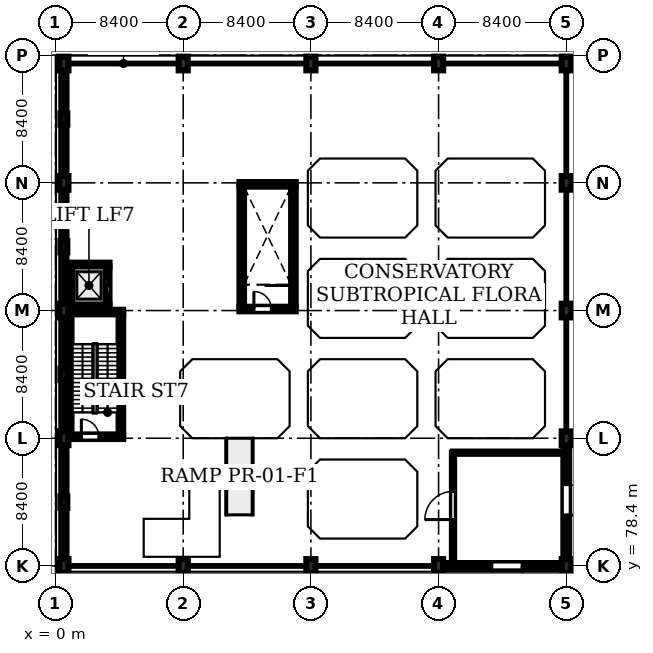
"""IFC4 building model, lengths in metres.
Left out: names, types, materials, properties, quantities, classifications, styles, units other than length and angle.
Written with IfcOpenShell. Run it as: python <this file> out.ifc"""

import sys

from ifc_helpers import new_model, si_unit, direction, frame, frame_2d, origin, origin_2d, place, context, subcontext, project, spatial, rectangle, extrude, element, fill, save


model = new_model("IFC4")
c1 = context("Model", 3, precision=1e-05, world=origin(), true_north=direction((0.0, 1.0)))
c2 = subcontext(c1, "Body", "Model", "MODEL_VIEW")
j1 = project(units=[si_unit("LENGTHUNIT", "METRE"), si_unit("PLANEANGLEUNIT", "RADIAN")], contexts=[c1])
p1 = place(None, origin())
s1 = spatial("IfcSite", under=j1, at=p1, CompositionType="ELEMENT")
p2 = place(p1, origin())
s2 = spatial("IfcBuilding", under=s1, at=p2, CompositionType="ELEMENT")
p3 = place(p2, origin())
s3 = spatial("IfcBuildingStorey", under=s2, at=p3, CompositionType="ELEMENT", Elevation=0.0)
for number, where, z_axis, x_axis in (
    (1, (0.55, 78.4, 0.0), (0.0, 0.0, 1.0), (1.0, 0.0, 0.0)),
    (2, (0.55, 86.8, 0.0), (0.0, 0.0, 1.0), (1.0, 0.0, 0.0)),
    (3, (0.55, 95.2, 0.0), (0.0, 0.0, 1.0), (1.0, 0.0, 0.0)),
    (4, (0.55, 103.6, 0.0), (0.0, 0.0, 1.0), (1.0, 0.0, 0.0)),
    (5, (0.55, 111.45, 0.0), (0.0, 0.0, 1.0), (1.0, 0.0, 0.0)),
):
    element("IfcColumn", number, at=place(p3, frame(where, z_axis=z_axis, x_axis=x_axis)), inside=s3, PredefinedType="COLUMN", context=c2, shape_type="SweptSolid", body=[
        extrude(rectangle(XDim=0.6, YDim=0.9, at=origin_2d()), origin(), (0.0, 0.0, 1.0), 5.18),
    ])
p4 = place(p3, frame((8.4, 78.4, 0.0), z_axis=(0.0, 0.0, 1.0), x_axis=(1.0, 0.0, 0.0)))
e6 = element("IfcColumn", 6, at=p4, inside=s3, PredefinedType="COLUMN", context=c2, shape_type="SweptSolid", body=[
    extrude(rectangle(XDim=0.6, YDim=0.9, at=origin_2d()), origin(), (0.0, 0.0, 1.0), 5.4),
])
p5 = place(p3, frame((8.4, 111.45, 0.0), z_axis=(0.0, 0.0, 1.0), x_axis=(1.0, 0.0, 0.0)))
e7 = element("IfcColumn", 7, at=p5, inside=s3, PredefinedType="COLUMN", context=c2, shape_type="SweptSolid", body=[
    extrude(rectangle(XDim=0.6, YDim=0.9, at=origin_2d()), origin(), (0.0, 0.0, 1.0), 5.18),
])
p6 = place(p3, frame((16.8, 78.4, 0.0), z_axis=(0.0, 0.0, 1.0), x_axis=(1.0, 0.0, 0.0)))
e8 = element("IfcColumn", 8, at=p6, inside=s3, PredefinedType="COLUMN", context=c2, shape_type="SweptSolid", body=[
    extrude(rectangle(XDim=0.6, YDim=0.9, at=origin_2d()), origin(), (0.0, 0.0, 1.0), 5.4),
])
p7 = place(p3, frame((16.8, 111.45, 0.0), z_axis=(0.0, 0.0, 1.0), x_axis=(1.0, 0.0, 0.0)))
e9 = element("IfcColumn", 9, at=p7, inside=s3, PredefinedType="COLUMN", context=c2, shape_type="SweptSolid", body=[
    extrude(rectangle(XDim=0.6, YDim=0.9, at=origin_2d()), origin(), (0.0, 0.0, 1.0), 5.18),
])
p8 = place(p3, frame((25.2, 78.4, 0.0), z_axis=(0.0, 0.0, 1.0), x_axis=(1.0, 0.0, 0.0)))
e10 = element("IfcColumn", 10, at=p8, inside=s3, PredefinedType="COLUMN", context=c2, shape_type="SweptSolid", body=[
    extrude(rectangle(XDim=0.6, YDim=0.9, at=origin_2d()), origin(), (0.0, 0.0, 1.0), 5.4),
])
p9 = place(p3, frame((25.2, 111.45, 0.0), z_axis=(0.0, 0.0, 1.0), x_axis=(1.0, 0.0, 0.0)))
e11 = element("IfcColumn", 11, at=p9, inside=s3, PredefinedType="COLUMN", context=c2, shape_type="SweptSolid", body=[
    extrude(rectangle(XDim=0.6, YDim=0.9, at=origin_2d()), origin(), (0.0, 0.0, 1.0), 5.18),
])
for number, where, z_axis, x_axis in (
    (12, (33.6, 78.4, 0.0), (0.0, 0.0, 1.0), (1.0, 0.0, 0.0)),
    (13, (33.6, 86.8, 0.0), (0.0, 0.0, 1.0), (1.0, 0.0, 0.0)),
    (14, (33.6, 95.2, 0.0), (0.0, 0.0, 1.0), (1.0, 0.0, 0.0)),
    (15, (33.6, 103.6, 0.0), (0.0, 0.0, 1.0), (1.0, 0.0, 0.0)),
):
    element("IfcColumn", number, at=place(p3, frame(where, z_axis=z_axis, x_axis=x_axis)), inside=s3, PredefinedType="COLUMN", context=c2, shape_type="SweptSolid", body=[
        extrude(rectangle(XDim=0.6, YDim=0.9, at=origin_2d()), origin(), (0.0, 0.0, 1.0), 5.4),
    ])
p10 = place(p3, frame((33.6, 111.45, 0.0), z_axis=(0.0, 0.0, 1.0), x_axis=(1.0, 0.0, 0.0)))
e16 = element("IfcColumn", 16, at=p10, inside=s3, PredefinedType="COLUMN", context=c2, shape_type="SweptSolid", body=[
    extrude(rectangle(XDim=0.6, YDim=0.9, at=origin_2d()), origin(), (0.0, 0.0, 1.0), 5.18),
])
for number, where, z_axis, x_axis in (
    (17, (0.55, 82.6, 0.0), (0.0, 0.0, 1.0), (1.0, 0.0, 0.0)),
    (18, (0.55, 91.0, 0.0), (0.0, 0.0, 1.0), (1.0, 0.0, 0.0)),
    (19, (0.55, 99.4, 0.0), (0.0, 0.0, 1.0), (1.0, 0.0, 0.0)),
    (20, (0.55, 107.8, 0.0), (0.0, 0.0, 1.0), (1.0, 0.0, 0.0)),
):
    element("IfcColumn", number, at=place(p3, frame(where, z_axis=z_axis, x_axis=x_axis)), inside=s3, PredefinedType="PILASTER", context=c2, shape_type="SweptSolid", body=[
        extrude(rectangle(XDim=0.45, YDim=0.75, at=origin_2d()), origin(), (0.0, 0.0, 1.0), 5.18),
    ])
p11 = place(p3, frame((0.75, 86.9, 0.0), z_axis=(0.0, 0.0, 1.0), x_axis=(1.0, 0.0, 0.0)))
e21 = element("IfcWall", 21, at=p11, inside=s3, PredefinedType="SHEAR", context=c2, shape_type="SweptSolid", body=[
    extrude(rectangle(XDim=3.7, YDim=0.3, at=frame_2d((1.85, 0.0))), origin(), (0.0, 0.0, 1.0), 5.18),
])
p12 = place(p11, frame((0.95, 0.0, 0.0)))
e22 = element("IfcOpeningElement", 22, at=p12, cuts=e21, PredefinedType="OPENING", context=c2, shape_type="SweptSolid", body=[
    extrude(rectangle(XDim=1.15, YDim=2.15, at=frame_2d((0.575, 1.075))), frame((0.0, 0.16, 0.0), z_axis=(0.0, -1.0, 0.0), x_axis=(1.0, 0.0, 0.0)), (0.0, 0.0, 1.0), 0.32),
])
p13 = place(p3, frame((0.75, 95.1, 0.0), z_axis=(0.0, 0.0, 1.0), x_axis=(1.0, 0.0, 0.0)))
e23 = element("IfcWall", 23, at=p13, inside=s3, PredefinedType="SHEAR", context=c2, shape_type="SweptSolid", body=[
    extrude(rectangle(XDim=3.7, YDim=0.3, at=frame_2d((1.85, 0.0))), origin(), (0.0, 0.0, 1.0), 5.18),
])
for number, where, z_axis, x_axis in (
    (24, (0.9, 87.05, 0.0), (0.0, 0.0, 1.0), (0.0, 1.0, 0.0)),
    (25, (4.3, 87.05, 0.0), (0.0, 0.0, 1.0), (0.0, 1.0, 0.0)),
):
    element("IfcWall", number, at=place(p3, frame(where, z_axis=z_axis, x_axis=x_axis)), inside=s3, PredefinedType="SHEAR", context=c2, shape_type="SweptSolid", body=[
        extrude(rectangle(XDim=7.9, YDim=0.3, at=frame_2d((3.95, 0.0))), origin(), (0.0, 0.0, 1.0), 5.18),
    ])
p14 = place(p3, frame((12.1, 95.3, 0.0), z_axis=(0.0, 0.0, 1.0), x_axis=(1.0, 0.0, 0.0)))
e26 = element("IfcWall", 26, at=p14, inside=s3, PredefinedType="SHEAR", context=c2, shape_type="SweptSolid", body=[
    extrude(rectangle(XDim=3.7, YDim=0.3, at=frame_2d((1.85, 0.0))), origin(), (0.0, 0.0, 1.0), 5.18),
])
p15 = place(p14, frame((0.95, 0.0, 0.0)))
e27 = element("IfcOpeningElement", 27, at=p15, cuts=e26, PredefinedType="OPENING", context=c2, shape_type="SweptSolid", body=[
    extrude(rectangle(XDim=1.15, YDim=2.15, at=frame_2d((0.575, 1.075))), frame((0.0, 0.16, 0.0), z_axis=(0.0, -1.0, 0.0), x_axis=(1.0, 0.0, 0.0)), (0.0, 0.0, 1.0), 0.32),
])
p16 = place(p3, frame((12.1, 103.5, 0.0), z_axis=(0.0, 0.0, 1.0), x_axis=(1.0, 0.0, 0.0)))
e28 = element("IfcWall", 28, at=p16, inside=s3, PredefinedType="SHEAR", context=c2, shape_type="SweptSolid", body=[
    extrude(rectangle(XDim=3.7, YDim=0.3, at=frame_2d((1.85, 0.0))), origin(), (0.0, 0.0, 1.0), 5.18),
])
for number, where, z_axis, x_axis in (
    (29, (12.25, 95.45, 0.0), (0.0, 0.0, 1.0), (0.0, 1.0, 0.0)),
    (30, (15.65, 95.45, 0.0), (0.0, 0.0, 1.0), (0.0, 1.0, 0.0)),
):
    element("IfcWall", number, at=place(p3, frame(where, z_axis=z_axis, x_axis=x_axis)), inside=s3, PredefinedType="SHEAR", context=c2, shape_type="SweptSolid", body=[
        extrude(rectangle(XDim=7.9, YDim=0.3, at=frame_2d((3.95, 0.0))), origin(), (0.0, 0.0, 1.0), 5.18),
    ])
for number, where, z_axis, x_axis in (
    (31, (0.85, 95.475, 0.0), (0.0, 0.0, 1.0), (1.0, 0.0, 0.0)),
    (32, (0.85, 98.225, 0.0), (0.0, 0.0, 1.0), (1.0, 0.0, 0.0)),
):
    element("IfcWall", number, at=place(p3, frame(where, z_axis=z_axis, x_axis=x_axis)), inside=s3, PredefinedType="SHEAR", context=c2, shape_type="SweptSolid", body=[
        extrude(rectangle(XDim=2.7, YDim=0.25, at=frame_2d((1.35, 0.0))), origin(), (0.0, 0.0, 1.0), 5.18),
    ])
p17 = place(p3, frame((0.975, 95.6, 0.0), z_axis=(0.0, 0.0, 1.0), x_axis=(0.0, 1.0, 0.0)))
e33 = element("IfcWall", 33, at=p17, inside=s3, PredefinedType="SHEAR", context=c2, shape_type="SweptSolid", body=[
    extrude(rectangle(XDim=2.5, YDim=0.25, at=frame_2d((1.25, 0.0))), origin(), (0.0, 0.0, 1.0), 5.18),
])
p18 = place(p3, frame((3.425, 95.6, 0.0), z_axis=(0.0, 0.0, 1.0), x_axis=(0.0, 1.0, 0.0)))
e34 = element("IfcWall", 34, at=p18, inside=s3, PredefinedType="SHEAR", context=c2, shape_type="SweptSolid", body=[
    extrude(rectangle(XDim=2.5, YDim=0.25, at=frame_2d((1.25, 0.0))), origin(), (0.0, 0.0, 1.0), 5.18),
])
p19 = place(p18, frame((0.71, 0.0, 0.0)))
e35 = element("IfcOpeningElement", 35, at=p19, cuts=e34, PredefinedType="OPENING", context=c2, shape_type="SweptSolid", body=[
    extrude(rectangle(XDim=1.08, YDim=2.18, at=frame_2d((0.54, 1.09))), frame((0.0, 0.135, 0.0), z_axis=(0.0, -1.0, 0.0), x_axis=(1.0, 0.0, 0.0)), (0.0, 0.0, 1.0), 0.27),
])
p20 = place(p3, frame((33.3, 78.4, 0.0), z_axis=(0.0, 0.0, 1.0), x_axis=(-1.0, 0.0, 0.0)))
e36 = element("IfcWall", 36, at=p20, inside=s3, PredefinedType="SOLIDWALL", context=c2, shape_type="SweptSolid", body=[
    extrude(rectangle(XDim=7.8, YDim=0.38, at=frame_2d((3.9, 0.0))), origin(), (0.0, 0.0, 1.0), 5.24),
])
p21 = place(p20, frame((2.6, 0.0, 0.0)))
e37 = element("IfcOpeningElement", 37, at=p21, cuts=e36, PredefinedType="OPENING", context=c2, shape_type="SweptSolid", body=[
    extrude(rectangle(XDim=2.0, YDim=2.4, at=frame_2d((1.0, 1.2))), frame((0.0, 0.2, 0.0), z_axis=(0.0, -1.0, 0.0), x_axis=(1.0, 0.0, 0.0)), (0.0, 0.0, 1.0), 0.4),
])
p22 = place(p3, frame((0.55, 78.85, 0.0), z_axis=(0.0, 0.0, 1.0), x_axis=(0.0, 1.0, 0.0)))
e38 = element("IfcWall", 38, at=p22, inside=s3, PredefinedType="STANDARD", context=c2, shape_type="SweptSolid", body=[
    extrude(rectangle(XDim=7.5, YDim=0.34, at=frame_2d((3.75, 0.0))), origin(), (0.0, 0.0, 1.0), 4.43),
])
p23 = place(p22, frame((0.75, 0.0, 1.0)))
e39 = element("IfcOpeningElement", 39, at=p23, cuts=e38, PredefinedType="OPENING", context=c2, shape_type="SweptSolid", body=[
    extrude(rectangle(XDim=1.6, YDim=2.0, at=frame_2d((0.8, 1.0))), frame((0.0, 0.18, 0.0), z_axis=(0.0, -1.0, 0.0), x_axis=(1.0, 0.0, 0.0)), (0.0, 0.0, 1.0), 0.36),
])
p24 = place(p3, frame((33.6, 86.35, 0.0), z_axis=(0.0, 0.0, 1.0), x_axis=(0.0, -1.0, 0.0)))
e40 = element("IfcWall", 40, at=p24, inside=s3, PredefinedType="SOLIDWALL", context=c2, shape_type="SweptSolid", body=[
    extrude(rectangle(XDim=7.5, YDim=0.38, at=frame_2d((3.75, 0.0))), origin(), (0.0, 0.0, 1.0), 5.24),
])
p25 = place(p24, frame((2.6, 0.0, 0.0)))
e41 = element("IfcOpeningElement", 41, at=p25, cuts=e40, PredefinedType="OPENING", context=c2, shape_type="SweptSolid", body=[
    extrude(rectangle(XDim=2.0, YDim=2.4, at=frame_2d((1.0, 1.2))), frame((0.0, 0.2, 0.0), z_axis=(0.0, -1.0, 0.0), x_axis=(1.0, 0.0, 0.0)), (0.0, 0.0, 1.0), 0.4),
])
p26 = place(p3, frame((0.55, 87.25, 0.0), z_axis=(0.0, 0.0, 1.0), x_axis=(0.0, 1.0, 0.0)))
e42 = element("IfcWall", 42, at=p26, inside=s3, PredefinedType="STANDARD", context=c2, shape_type="SweptSolid", body=[
    extrude(rectangle(XDim=7.5, YDim=0.34, at=frame_2d((3.75, 0.0))), origin(), (0.0, 0.0, 1.0), 4.43),
])
p27 = place(p26, frame((0.75, 0.0, 1.0)))
e43 = element("IfcOpeningElement", 43, at=p27, cuts=e42, PredefinedType="OPENING", context=c2, shape_type="SweptSolid", body=[
    extrude(rectangle(XDim=1.6, YDim=2.0, at=frame_2d((0.8, 1.0))), frame((0.0, 0.18, 0.0), z_axis=(0.0, -1.0, 0.0), x_axis=(1.0, 0.0, 0.0)), (0.0, 0.0, 1.0), 0.36),
])
p28 = place(p3, frame((0.55, 95.65, 0.0), z_axis=(0.0, 0.0, 1.0), x_axis=(0.0, 1.0, 0.0)))
e44 = element("IfcWall", 44, at=p28, inside=s3, PredefinedType="STANDARD", context=c2, shape_type="SweptSolid", body=[
    extrude(rectangle(XDim=7.5, YDim=0.34, at=frame_2d((3.75, 0.0))), origin(), (0.0, 0.0, 1.0), 4.43),
])
p29 = place(p28, frame((0.75, 0.0, 1.0)))
e45 = element("IfcOpeningElement", 45, at=p29, cuts=e44, PredefinedType="OPENING", context=c2, shape_type="SweptSolid", body=[
    extrude(rectangle(XDim=1.6, YDim=2.0, at=frame_2d((0.8, 1.0))), frame((0.0, 0.18, 0.0), z_axis=(0.0, -1.0, 0.0), x_axis=(1.0, 0.0, 0.0)), (0.0, 0.0, 1.0), 0.36),
])
p30 = place(p3, frame((0.55, 104.05, 0.0), z_axis=(0.0, 0.0, 1.0), x_axis=(0.0, 1.0, 0.0)))
e46 = element("IfcWall", 46, at=p30, inside=s3, PredefinedType="STANDARD", context=c2, shape_type="SweptSolid", body=[
    extrude(rectangle(XDim=6.95, YDim=0.34, at=frame_2d((3.475, 0.0))), origin(), (0.0, 0.0, 1.0), 4.43),
])
p31 = place(p30, frame((0.75, 0.0, 1.0)))
e47 = element("IfcOpeningElement", 47, at=p31, cuts=e46, PredefinedType="OPENING", context=c2, shape_type="SweptSolid", body=[
    extrude(rectangle(XDim=1.6, YDim=2.0, at=frame_2d((0.8, 1.0))), frame((0.0, 0.18, 0.0), z_axis=(0.0, -1.0, 0.0), x_axis=(1.0, 0.0, 0.0)), (0.0, 0.0, 1.0), 0.36),
])
p32 = place(p3, frame((26.15, 78.85, 0.0), z_axis=(0.0, 0.0, 1.0), x_axis=(0.0, 1.0, 0.0)))
e48 = element("IfcWall", 48, at=p32, inside=s3, PredefinedType="PARTITIONING", context=c2, shape_type="SweptSolid", body=[
    extrude(rectangle(XDim=7.0, YDim=0.145, at=frame_2d((3.5, 0.0))), origin(), (0.0, 0.0, 1.0), 5.18),
])
p33 = place(p32, frame((2.6, 0.0, 0.0)))
e49 = element("IfcOpeningElement", 49, at=p33, cuts=e48, PredefinedType="OPENING", context=c2, shape_type="SweptSolid", body=[
    extrude(rectangle(XDim=1.85, YDim=2.25, at=frame_2d((0.925, 1.125))), frame((0.0, 0.083, 0.0), z_axis=(0.0, -1.0, 0.0), x_axis=(1.0, 0.0, 0.0)), (0.0, 0.0, 1.0), 0.165),
])
p34 = place(p3, frame((26.15, 85.85, 0.0), z_axis=(0.0, 0.0, 1.0), x_axis=(1.0, 0.0, 0.0)))
e50 = element("IfcWall", 50, at=p34, inside=s3, PredefinedType="PARTITIONING", context=c2, shape_type="SweptSolid", body=[
    extrude(rectangle(XDim=7.0, YDim=0.145, at=frame_2d((3.5, 0.0))), origin(), (0.0, 0.0, 1.0), 5.18),
])
p35 = place(p21, origin())
e51 = element("IfcDoor", 51, at=p35, inside=s3, OperationType="SINGLE_SWING_LEFT", PredefinedType="DOOR", context=c2, shape_type="SweptSolid", body=[
    extrude(rectangle(XDim=2.0, YDim=2.4, at=frame_2d((1.0, 1.2))), frame((0.0, 0.025, 0.0), z_axis=(0.0, -1.0, 0.0), x_axis=(1.0, 0.0, 0.0)), (0.0, 0.0, 1.0), 0.05),
])
fill(e37, e51)
p36 = place(p23, origin())
e52 = element("IfcWindow", 52, at=p36, inside=s3, PartitioningType="DOUBLE_PANEL_VERTICAL", PredefinedType="WINDOW", context=c2, shape_type="SweptSolid", body=[
    extrude(rectangle(XDim=1.6, YDim=2.0, at=frame_2d((0.8, 1.0))), frame((0.0, 0.03, 0.0), z_axis=(0.0, -1.0, 0.0), x_axis=(1.0, 0.0, 0.0)), (0.0, 0.0, 1.0), 0.06),
])
fill(e39, e52)
p37 = place(p25, origin())
e53 = element("IfcDoor", 53, at=p37, inside=s3, OperationType="SINGLE_SWING_RIGHT", PredefinedType="DOOR", context=c2, shape_type="SweptSolid", body=[
    extrude(rectangle(XDim=2.0, YDim=2.4, at=frame_2d((1.0, 1.2))), frame((0.0, 0.025, 0.0), z_axis=(0.0, -1.0, 0.0), x_axis=(1.0, 0.0, 0.0)), (0.0, 0.0, 1.0), 0.05),
])
fill(e41, e53)
p38 = place(p27, origin())
e54 = element("IfcWindow", 54, at=p38, inside=s3, PartitioningType="DOUBLE_PANEL_VERTICAL", PredefinedType="WINDOW", context=c2, shape_type="SweptSolid", body=[
    extrude(rectangle(XDim=1.6, YDim=2.0, at=frame_2d((0.8, 1.0))), frame((0.0, 0.03, 0.0), z_axis=(0.0, -1.0, 0.0), x_axis=(1.0, 0.0, 0.0)), (0.0, 0.0, 1.0), 0.06),
])
fill(e43, e54)
p39 = place(p29, origin())
e55 = element("IfcWindow", 55, at=p39, inside=s3, PartitioningType="DOUBLE_PANEL_VERTICAL", PredefinedType="WINDOW", context=c2, shape_type="SweptSolid", body=[
    extrude(rectangle(XDim=1.6, YDim=2.0, at=frame_2d((0.8, 1.0))), frame((0.0, 0.03, 0.0), z_axis=(0.0, -1.0, 0.0), x_axis=(1.0, 0.0, 0.0)), (0.0, 0.0, 1.0), 0.06),
])
fill(e45, e55)
p40 = place(p31, origin())
e56 = element("IfcWindow", 56, at=p40, inside=s3, PartitioningType="DOUBLE_PANEL_VERTICAL", PredefinedType="WINDOW", context=c2, shape_type="SweptSolid", body=[
    extrude(rectangle(XDim=1.6, YDim=2.0, at=frame_2d((0.8, 1.0))), frame((0.0, 0.03, 0.0), z_axis=(0.0, -1.0, 0.0), x_axis=(1.0, 0.0, 0.0)), (0.0, 0.0, 1.0), 0.06),
])
fill(e47, e56)
p41 = place(p33, origin())
e57 = element("IfcDoor", 57, at=p41, inside=s3, OperationType="SINGLE_SWING_LEFT", PredefinedType="DOOR", context=c2, shape_type="SweptSolid", body=[
    extrude(rectangle(XDim=1.85, YDim=2.25, at=frame_2d((0.925, 1.125))), frame((0.0, 0.025, 0.0), z_axis=(0.0, -1.0, 0.0), x_axis=(1.0, 0.0, 0.0)), (0.0, 0.0, 1.0), 0.05),
])
fill(e49, e57)
p42 = place(p12, origin())
e58 = element("IfcDoor", 58, at=p42, inside=s3, OperationType="SINGLE_SWING_LEFT", PredefinedType="DOOR", context=c2, shape_type="SweptSolid", body=[
    extrude(rectangle(XDim=1.15, YDim=2.15, at=frame_2d((0.575, 1.075))), frame((0.0, 0.025, 0.0), z_axis=(0.0, -1.0, 0.0), x_axis=(1.0, 0.0, 0.0)), (0.0, 0.0, 1.0), 0.05),
])
fill(e22, e58)
p43 = place(p15, origin())
e59 = element("IfcDoor", 59, at=p43, inside=s3, OperationType="SINGLE_SWING_LEFT", PredefinedType="DOOR", context=c2, shape_type="SweptSolid", body=[
    extrude(rectangle(XDim=1.15, YDim=2.15, at=frame_2d((0.575, 1.075))), frame((0.0, 0.025, 0.0), z_axis=(0.0, -1.0, 0.0), x_axis=(1.0, 0.0, 0.0)), (0.0, 0.0, 1.0), 0.05),
])
fill(e27, e59)
p44 = place(p19, origin())
e60 = element("IfcDoor", 60, at=p44, inside=s3, OperationType="SLIDING_TO_LEFT", PredefinedType="DOOR", context=c2, shape_type="SweptSolid", body=[
    extrude(rectangle(XDim=1.08, YDim=2.18, at=frame_2d((0.54, 1.09))), frame((0.0, 0.025, 0.0), z_axis=(0.0, -1.0, 0.0), x_axis=(1.0, 0.0, 0.0)), (0.0, 0.0, 1.0), 0.05),
])
fill(e35, e60)
save(model, sys.argv[1])
